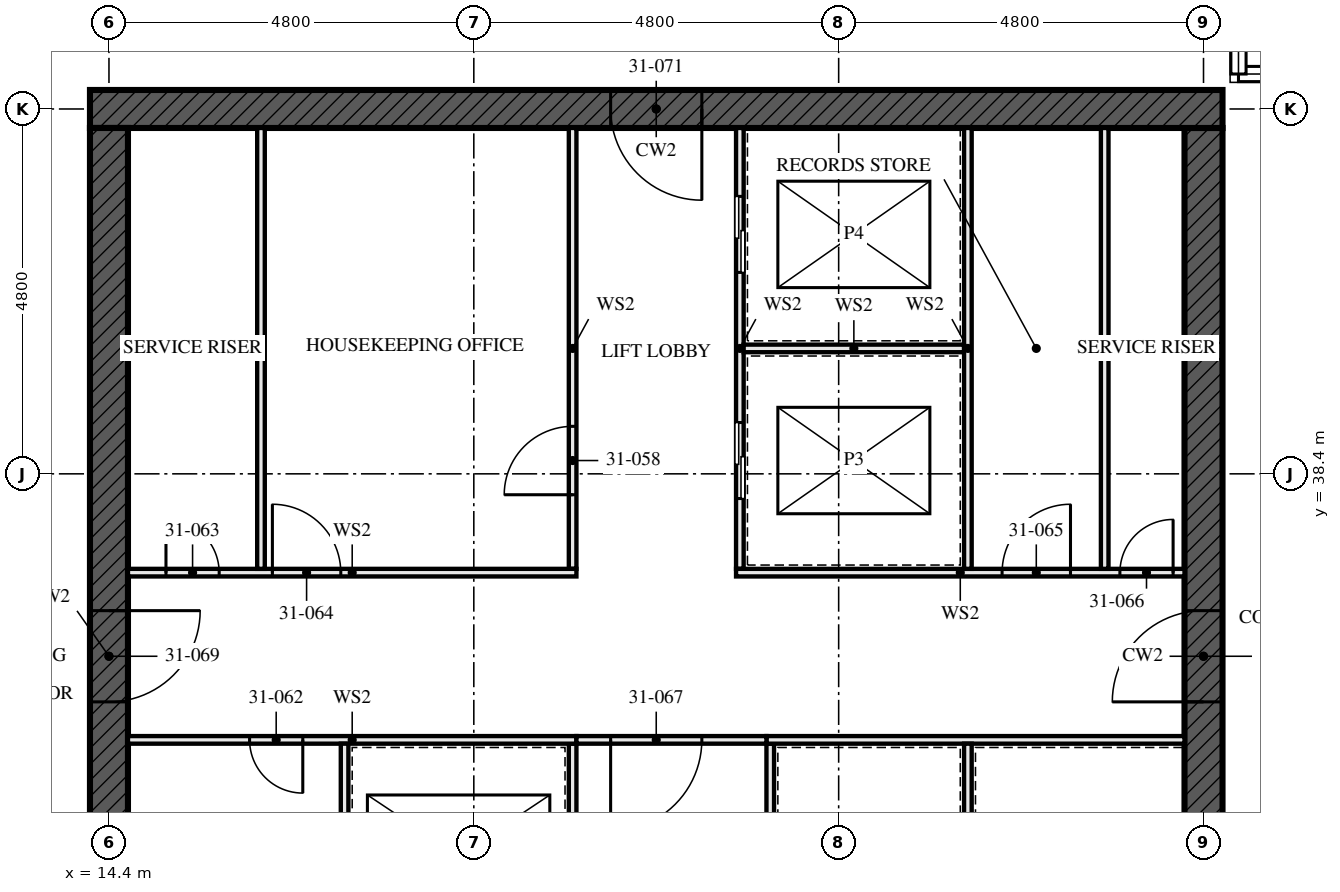
"""IFC4 building model, lengths in metres.
Left out: names, types, materials, properties, quantities, classifications, styles, units other than length and angle.
Written with IfcOpenShell. Run it as: python <this file> out.ifc"""

import sys

from ifc_helpers import new_model, si_unit, direction, frame, frame_2d, origin, place, context, subcontext, project, spatial, rectangle, extrude, element, fill, save


model = new_model("IFC4")
c1 = context("Model", 3, precision=1e-05, world=origin(), true_north=direction((0.0, 1.0)))
c2 = subcontext(c1, "Body", "Model", "MODEL_VIEW")
j1 = project(units=[si_unit("LENGTHUNIT", "METRE"), si_unit("PLANEANGLEUNIT", "RADIAN")], contexts=[c1])
p1 = place(None, origin())
s1 = spatial("IfcSite", under=j1, at=p1, CompositionType="ELEMENT")
p2 = place(p1, origin())
s2 = spatial("IfcBuilding", under=s1, at=p2, CompositionType="ELEMENT")
p3 = place(p2, frame((0.0, 0.0, 115.5)))
s3 = spatial("IfcBuildingStorey", under=s2, at=p3, CompositionType="ELEMENT", Elevation=115.5)
p4 = place(p3, frame((29.05, 43.2, -0.17), z_axis=(0.0, 0.0, 1.0), x_axis=(-1.0, 0.0, 0.0)))
e1 = element("IfcWall", 1, at=p4, inside=s3, PredefinedType="SHEAR", context=c2, shape_type="SweptSolid", body=[
    extrude(rectangle(XDim=14.9, YDim=0.5, at=frame_2d((7.45, 0.0))), origin(), (0.0, 0.0, 1.0), 3.5),
])
p5 = place(p4, frame((6.85, 0.0, 0.17)))
e2 = element("IfcOpeningElement", 2, at=p5, cuts=e1, PredefinedType="OPENING", context=c2, shape_type="SweptSolid", body=[
    extrude(rectangle(XDim=1.2, YDim=2.1, at=frame_2d((0.6, 1.05))), frame((0.0, 0.26, 0.0), z_axis=(0.0, -1.0, 0.0), x_axis=(1.0, 0.0, 0.0)), (0.0, 0.0, 1.0), 0.521),
])
p6 = place(p3, frame((14.4, 42.95, -0.17), z_axis=(0.0, 0.0, 1.0), x_axis=(0.0, -1.0, 0.0)))
e3 = element("IfcWall", 3, at=p6, inside=s3, PredefinedType="SHEAR", context=c2, shape_type="SweptSolid", body=[
    extrude(rectangle(XDim=13.9, YDim=0.5, at=frame_2d((6.95, 0.0))), origin(), (0.0, 0.0, 1.0), 3.5),
])
p7 = place(p6, frame((6.35, 0.0, 0.17)))
e4 = element("IfcOpeningElement", 4, at=p7, cuts=e3, PredefinedType="OPENING", context=c2, shape_type="SweptSolid", body=[
    extrude(rectangle(XDim=1.2, YDim=2.1, at=frame_2d((0.6, 1.05))), frame((0.0, 0.26, 0.0), z_axis=(0.0, -1.0, 0.0), x_axis=(1.0, 0.0, 0.0)), (0.0, 0.0, 1.0), 0.521),
])
p8 = place(p3, frame((28.8, 29.05, -0.17), z_axis=(0.0, 0.0, 1.0), x_axis=(0.0, 1.0, 0.0)))
e5 = element("IfcWall", 5, at=p8, inside=s3, PredefinedType="SHEAR", context=c2, shape_type="SweptSolid", body=[
    extrude(rectangle(XDim=13.9, YDim=0.5, at=frame_2d((6.95, 0.0))), origin(), (0.0, 0.0, 1.0), 3.5),
])
p9 = place(p8, frame((6.35, 0.0, 0.17)))
e6 = element("IfcOpeningElement", 6, at=p9, cuts=e5, PredefinedType="OPENING", context=c2, shape_type="SweptSolid", body=[
    extrude(rectangle(XDim=1.2, YDim=2.1, at=frame_2d((0.6, 1.05))), frame((0.0, 0.26, 0.0), z_axis=(0.0, -1.0, 0.0), x_axis=(1.0, 0.0, 0.0)), (0.0, 0.0, 1.0), 0.521),
])
for number, where, z_axis, x_axis in (
    (7, (16.4, 37.15, 0.0), (0.0, 0.0, 1.0), (0.0, 1.0, 0.0)),
    (8, (27.5, 37.15, 0.0), (0.0, 0.0, 1.0), (0.0, 1.0, 0.0)),
):
    element("IfcWall", number, at=place(p3, frame(where, z_axis=z_axis, x_axis=x_axis)), inside=s3, PredefinedType="SOLIDWALL", context=c2, shape_type="SweptSolid", body=[
        extrude(rectangle(XDim=5.8, YDim=0.1, at=frame_2d((2.9, 0.0))), origin(), (0.0, 0.0, 1.0), 3.33),
    ])
p10 = place(p3, frame((20.5, 29.05, 0.0), z_axis=(0.0, 0.0, 1.0), x_axis=(0.0, 1.0, 0.0)))
e9 = element("IfcWall", 9, at=p10, inside=s3, PredefinedType="SOLIDWALL", context=c2, shape_type="SweptSolid", body=[
    extrude(rectangle(XDim=5.8, YDim=0.1, at=frame_2d((2.9, 0.0))), origin(), (0.0, 0.0, 1.0), 3.33),
])
p11 = place(p10, frame((0.8, 0.0, 0.0)))
e10 = element("IfcOpeningElement", 10, at=p11, cuts=e9, PredefinedType="OPENING", context=c2, shape_type="SweptSolid", body=[
    extrude(rectangle(XDim=1.1, YDim=2.3, at=frame_2d((0.55, 1.15))), frame((0.0, 0.061, 0.0), z_axis=(0.0, -1.0, 0.0), x_axis=(1.0, 0.0, 0.0)), (0.0, 0.0, 1.0), 0.121),
])
p12 = place(p10, frame((3.775, 0.0, 0.0)))
e11 = element("IfcOpeningElement", 11, at=p12, cuts=e9, PredefinedType="OPENING", context=c2, shape_type="SweptSolid", body=[
    extrude(rectangle(XDim=1.1, YDim=2.3, at=frame_2d((0.55, 1.15))), frame((0.0, 0.061, 0.0), z_axis=(0.0, -1.0, 0.0), x_axis=(1.0, 0.0, 0.0)), (0.0, 0.0, 1.0), 0.121),
])
p13 = place(p3, frame((20.5, 37.15, 0.0), z_axis=(0.0, 0.0, 1.0), x_axis=(0.0, 1.0, 0.0)))
e12 = element("IfcWall", 12, at=p13, inside=s3, PredefinedType="SOLIDWALL", context=c2, shape_type="SweptSolid", body=[
    extrude(rectangle(XDim=5.8, YDim=0.1, at=frame_2d((2.9, 0.0))), origin(), (0.0, 0.0, 1.0), 3.33),
])
p14 = place(p13, frame((0.975, 0.0, 0.0)))
e13 = element("IfcOpeningElement", 13, at=p14, cuts=e12, PredefinedType="OPENING", context=c2, shape_type="SweptSolid", body=[
    extrude(rectangle(XDim=0.9, YDim=2.1, at=frame_2d((0.45, 1.05))), frame((0.0, 0.061, 0.0), z_axis=(0.0, -1.0, 0.0), x_axis=(1.0, 0.0, 0.0)), (0.0, 0.0, 1.0), 0.121),
])
p15 = place(p3, frame((22.7, 37.15, 0.0), z_axis=(0.0, 0.0, 1.0), x_axis=(0.0, 1.0, 0.0)))
e14 = element("IfcWall", 14, at=p15, inside=s3, PredefinedType="SOLIDWALL", context=c2, shape_type="SweptSolid", body=[
    extrude(rectangle(XDim=5.8, YDim=0.1, at=frame_2d((2.9, 0.0))), origin(), (0.0, 0.0, 1.0), 3.33),
])
p16 = place(p15, frame((0.925, 0.0, 0.0)))
e15 = element("IfcOpeningElement", 15, at=p16, cuts=e14, PredefinedType="OPENING", context=c2, shape_type="SweptSolid", body=[
    extrude(rectangle(XDim=1.0, YDim=2.1, at=frame_2d((0.5, 1.05))), frame((0.0, 0.061, 0.0), z_axis=(0.0, -1.0, 0.0), x_axis=(1.0, 0.0, 0.0)), (0.0, 0.0, 1.0), 0.121),
])
p17 = place(p15, frame((3.9, 0.0, 0.0)))
e16 = element("IfcOpeningElement", 16, at=p17, cuts=e14, PredefinedType="OPENING", context=c2, shape_type="SweptSolid", body=[
    extrude(rectangle(XDim=1.0, YDim=2.1, at=frame_2d((0.5, 1.05))), frame((0.0, 0.061, 0.0), z_axis=(0.0, -1.0, 0.0), x_axis=(1.0, 0.0, 0.0)), (0.0, 0.0, 1.0), 0.121),
])
p18 = place(p3, frame((23.1, 29.05, 0.0), z_axis=(0.0, 0.0, 1.0), x_axis=(0.0, 1.0, 0.0)))
e17 = element("IfcWall", 17, at=p18, inside=s3, PredefinedType="SOLIDWALL", context=c2, shape_type="SweptSolid", body=[
    extrude(rectangle(XDim=5.8, YDim=0.1, at=frame_2d((2.9, 0.0))), origin(), (0.0, 0.0, 1.0), 3.33),
])
p19 = place(p18, frame((1.0, 0.0, 0.0)))
e18 = element("IfcOpeningElement", 18, at=p19, cuts=e17, PredefinedType="OPENING", context=c2, shape_type="SweptSolid", body=[
    extrude(rectangle(XDim=0.7, YDim=2.1, at=frame_2d((0.35, 1.05))), frame((0.0, 0.061, 0.0), z_axis=(0.0, -1.0, 0.0), x_axis=(1.0, 0.0, 0.0)), (0.0, 0.0, 1.0), 0.121),
])
p20 = place(p3, frame((14.65, 34.9, 0.0), z_axis=(0.0, 0.0, 1.0), x_axis=(1.0, 0.0, 0.0)))
e19 = element("IfcWall", 19, at=p20, inside=s3, PredefinedType="SOLIDWALL", context=c2, shape_type="SweptSolid", body=[
    extrude(rectangle(XDim=5.9, YDim=0.1, at=frame_2d((2.95, 0.0))), origin(), (0.0, 0.0, 1.0), 3.33),
])
p21 = place(p20, frame((1.6, 0.0, 0.0)))
e20 = element("IfcOpeningElement", 20, at=p21, cuts=e19, PredefinedType="OPENING", context=c2, shape_type="SweptSolid", body=[
    extrude(rectangle(XDim=0.7, YDim=2.1, at=frame_2d((0.35, 1.05))), frame((0.0, 0.061, 0.0), z_axis=(0.0, -1.0, 0.0), x_axis=(1.0, 0.0, 0.0)), (0.0, 0.0, 1.0), 0.121),
])
p22 = place(p3, frame((23.05, 34.9, 0.0), z_axis=(0.0, 0.0, 1.0), x_axis=(1.0, 0.0, 0.0)))
e21 = element("IfcWall", 21, at=p22, inside=s3, PredefinedType="SOLIDWALL", context=c2, shape_type="SweptSolid", body=[
    extrude(rectangle(XDim=5.5, YDim=0.1, at=frame_2d((2.75, 0.0))), origin(), (0.0, 0.0, 1.0), 3.33),
])
p23 = place(p3, frame((14.65, 37.1, 0.0), z_axis=(0.0, 0.0, 1.0), x_axis=(1.0, 0.0, 0.0)))
e22 = element("IfcWall", 22, at=p23, inside=s3, PredefinedType="SOLIDWALL", context=c2, shape_type="SweptSolid", body=[
    extrude(rectangle(XDim=5.9, YDim=0.1, at=frame_2d((2.95, 0.0))), origin(), (0.0, 0.0, 1.0), 3.33),
])
p24 = place(p23, frame((0.5, 0.0, 0.0)))
e23 = element("IfcOpeningElement", 23, at=p24, cuts=e22, PredefinedType="OPENING", context=c2, shape_type="SweptSolid", body=[
    extrude(rectangle(XDim=0.7, YDim=2.1, at=frame_2d((0.35, 1.05))), frame((0.0, 0.061, 0.0), z_axis=(0.0, -1.0, 0.0), x_axis=(1.0, 0.0, 0.0)), (0.0, 0.0, 1.0), 0.121),
])
p25 = place(p23, frame((1.9, 0.0, 0.0)))
e24 = element("IfcOpeningElement", 24, at=p25, cuts=e22, PredefinedType="OPENING", context=c2, shape_type="SweptSolid", body=[
    extrude(rectangle(XDim=0.9, YDim=2.1, at=frame_2d((0.45, 1.05))), frame((0.0, 0.061, 0.0), z_axis=(0.0, -1.0, 0.0), x_axis=(1.0, 0.0, 0.0)), (0.0, 0.0, 1.0), 0.121),
])
p26 = place(p3, frame((22.65, 37.1, 0.0), z_axis=(0.0, 0.0, 1.0), x_axis=(1.0, 0.0, 0.0)))
e25 = element("IfcWall", 25, at=p26, inside=s3, PredefinedType="SOLIDWALL", context=c2, shape_type="SweptSolid", body=[
    extrude(rectangle(XDim=5.9, YDim=0.1, at=frame_2d((2.95, 0.0))), origin(), (0.0, 0.0, 1.0), 3.33),
])
p27 = place(p26, frame((3.5, 0.0, 0.0)))
e26 = element("IfcOpeningElement", 26, at=p27, cuts=e25, PredefinedType="OPENING", context=c2, shape_type="SweptSolid", body=[
    extrude(rectangle(XDim=0.9, YDim=2.1, at=frame_2d((0.45, 1.05))), frame((0.0, 0.061, 0.0), z_axis=(0.0, -1.0, 0.0), x_axis=(1.0, 0.0, 0.0)), (0.0, 0.0, 1.0), 0.121),
])
p28 = place(p26, frame((5.05, 0.0, 0.0)))
e27 = element("IfcOpeningElement", 27, at=p28, cuts=e25, PredefinedType="OPENING", context=c2, shape_type="SweptSolid", body=[
    extrude(rectangle(XDim=0.7, YDim=2.1, at=frame_2d((0.35, 1.05))), frame((0.0, 0.061, 0.0), z_axis=(0.0, -1.0, 0.0), x_axis=(1.0, 0.0, 0.0)), (0.0, 0.0, 1.0), 0.121),
])
p29 = place(p3, frame((20.55, 34.9, 0.0), z_axis=(0.0, 0.0, 1.0), x_axis=(1.0, 0.0, 0.0)))
e28 = element("IfcWall", 28, at=p29, inside=s3, PredefinedType="SOLIDWALL", context=c2, shape_type="SweptSolid", body=[
    extrude(rectangle(XDim=2.5, YDim=0.1, at=frame_2d((1.25, 0.0))), origin(), (0.0, 0.0, 1.0), 3.33),
])
p30 = place(p29, frame((0.45, 0.0, 0.0)))
e29 = element("IfcOpeningElement", 29, at=p30, cuts=e28, PredefinedType="OPENING", context=c2, shape_type="SweptSolid", body=[
    extrude(rectangle(XDim=1.2, YDim=2.1, at=frame_2d((0.6, 1.05))), frame((0.0, 0.061, 0.0), z_axis=(0.0, -1.0, 0.0), x_axis=(1.0, 0.0, 0.0)), (0.0, 0.0, 1.0), 0.121),
])
p31 = place(p3, frame((17.5, 29.05, 0.0), z_axis=(0.0, 0.0, 1.0), x_axis=(0.0, 1.0, 0.0)))
e30 = element("IfcWall", 30, at=p31, inside=s3, PredefinedType="SOLIDWALL", context=c2, shape_type="SweptSolid", body=[
    extrude(rectangle(XDim=5.8, YDim=0.1, at=frame_2d((2.9, 0.0))), origin(), (0.0, 0.0, 1.0), 3.33),
])
p32 = place(p3, frame((22.75, 40.05, 0.0), z_axis=(0.0, 0.0, 1.0), x_axis=(1.0, 0.0, 0.0)))
e31 = element("IfcWall", 31, at=p32, inside=s3, PredefinedType="SOLIDWALL", context=c2, shape_type="SweptSolid", body=[
    extrude(rectangle(XDim=2.9, YDim=0.1, at=frame_2d((1.45, 0.0))), origin(), (0.0, 0.0, 1.0), 3.33),
])
p33 = place(p3, frame((25.7, 37.15, 0.0), z_axis=(0.0, 0.0, 1.0), x_axis=(0.0, 1.0, 0.0)))
e32 = element("IfcWall", 32, at=p33, inside=s3, PredefinedType="SOLIDWALL", context=c2, shape_type="SweptSolid", body=[
    extrude(rectangle(XDim=5.8, YDim=0.1, at=frame_2d((2.9, 0.0))), origin(), (0.0, 0.0, 1.0), 3.33),
])
p34 = place(p3, frame((25.7, 31.95, 0.0), z_axis=(0.0, 0.0, 1.0), x_axis=(0.0, 1.0, 0.0)))
e33 = element("IfcWall", 33, at=p34, inside=s3, PredefinedType="SOLIDWALL", context=c2, shape_type="SweptSolid", body=[
    extrude(rectangle(XDim=2.9, YDim=0.1, at=frame_2d((1.45, 0.0))), origin(), (0.0, 0.0, 1.0), 3.33),
])
p35 = place(p14, origin())
e34 = element("IfcDoor", 34, at=p35, inside=s3, OperationType="SINGLE_SWING_RIGHT", PredefinedType="DOOR", context=c2, shape_type="SweptSolid", body=[
    extrude(rectangle(XDim=0.9, YDim=2.1, at=frame_2d((0.45, 1.05))), frame((0.0, 0.027, 0.0), z_axis=(0.0, -1.0, 0.0), x_axis=(1.0, 0.0, 0.0)), (0.0, 0.0, 1.0), 0.054),
])
fill(e13, e34)
p36 = place(p16, origin())
e35 = element("IfcDoor", 35, at=p36, inside=s3, OperationType="SLIDING_TO_LEFT", PredefinedType="DOOR", context=c2, shape_type="SweptSolid", body=[
    extrude(rectangle(XDim=1.0, YDim=2.1, at=frame_2d((0.5, 1.05))), frame((0.0, 0.05, 0.0), z_axis=(0.0, -1.0, 0.0), x_axis=(1.0, 0.0, 0.0)), (0.0, 0.0, 1.0), 0.1),
])
fill(e15, e35)
p37 = place(p17, origin())
e36 = element("IfcDoor", 36, at=p37, inside=s3, OperationType="SLIDING_TO_LEFT", PredefinedType="DOOR", context=c2, shape_type="SweptSolid", body=[
    extrude(rectangle(XDim=1.0, YDim=2.1, at=frame_2d((0.5, 1.05))), frame((0.0, 0.05, 0.0), z_axis=(0.0, -1.0, 0.0), x_axis=(1.0, 0.0, 0.0)), (0.0, 0.0, 1.0), 0.1),
])
fill(e16, e36)
p38 = place(p21, frame((0.7, 0.0, 0.0), z_axis=(0.0, 0.0, 1.0), x_axis=(-1.0, 0.0, 0.0)))
e37 = element("IfcDoor", 37, at=p38, inside=s3, OperationType="SINGLE_SWING_RIGHT", PredefinedType="DOOR", context=c2, shape_type="SweptSolid", body=[
    extrude(rectangle(XDim=0.7, YDim=2.1, at=frame_2d((0.35, 1.05))), frame((0.0, 0.027, 0.0), z_axis=(0.0, -1.0, 0.0), x_axis=(1.0, 0.0, 0.0)), (0.0, 0.0, 1.0), 0.054),
])
fill(e20, e37)
p39 = place(p24, origin())
e38 = element("IfcDoor", 38, at=p39, inside=s3, OperationType="SINGLE_SWING_RIGHT", PredefinedType="DOOR", context=c2, shape_type="SweptSolid", body=[
    extrude(rectangle(XDim=0.7, YDim=2.1, at=frame_2d((0.35, 1.05))), frame((0.0, 0.027, 0.0), z_axis=(0.0, -1.0, 0.0), x_axis=(1.0, 0.0, 0.0)), (0.0, 0.0, 1.0), 0.054),
])
fill(e23, e38)
p40 = place(p25, origin())
e39 = element("IfcDoor", 39, at=p40, inside=s3, OperationType="SINGLE_SWING_RIGHT", PredefinedType="DOOR", context=c2, shape_type="SweptSolid", body=[
    extrude(rectangle(XDim=0.9, YDim=2.1, at=frame_2d((0.45, 1.05))), frame((0.0, 0.027, 0.0), z_axis=(0.0, -1.0, 0.0), x_axis=(1.0, 0.0, 0.0)), (0.0, 0.0, 1.0), 0.054),
])
fill(e24, e39)
p41 = place(p27, origin())
e40 = element("IfcDoor", 40, at=p41, inside=s3, OperationType="SINGLE_SWING_LEFT", PredefinedType="DOOR", context=c2, shape_type="SweptSolid", body=[
    extrude(rectangle(XDim=0.9, YDim=2.1, at=frame_2d((0.45, 1.05))), frame((0.0, 0.027, 0.0), z_axis=(0.0, -1.0, 0.0), x_axis=(1.0, 0.0, 0.0)), (0.0, 0.0, 1.0), 0.054),
])
fill(e26, e40)
p42 = place(p28, origin())
e41 = element("IfcDoor", 41, at=p42, inside=s3, OperationType="SINGLE_SWING_LEFT", PredefinedType="DOOR", context=c2, shape_type="SweptSolid", body=[
    extrude(rectangle(XDim=0.7, YDim=2.1, at=frame_2d((0.35, 1.05))), frame((0.0, 0.027, 0.0), z_axis=(0.0, -1.0, 0.0), x_axis=(1.0, 0.0, 0.0)), (0.0, 0.0, 1.0), 0.054),
])
fill(e27, e41)
p43 = place(p30, frame((1.2, 0.0, 0.0), z_axis=(0.0, 0.0, 1.0), x_axis=(-1.0, 0.0, 0.0)))
e42 = element("IfcDoor", 42, at=p43, inside=s3, OperationType="SINGLE_SWING_LEFT", PredefinedType="DOOR", context=c2, shape_type="SweptSolid", body=[
    extrude(rectangle(XDim=1.2, YDim=2.1, at=frame_2d((0.6, 1.05))), frame((0.0, 0.027, 0.0), z_axis=(0.0, -1.0, 0.0), x_axis=(1.0, 0.0, 0.0)), (0.0, 0.0, 1.0), 0.054),
])
fill(e29, e42)
p44 = place(p7, origin())
e43 = element("IfcDoor", 43, at=p44, inside=s3, OperationType="SINGLE_SWING_LEFT", PredefinedType="DOOR", context=c2, shape_type="SweptSolid", body=[
    extrude(rectangle(XDim=1.2, YDim=2.1, at=frame_2d((0.6, 1.05))), frame((0.0, 0.027, 0.0), z_axis=(0.0, -1.0, 0.0), x_axis=(1.0, 0.0, 0.0)), (0.0, 0.0, 1.0), 0.054),
])
fill(e4, e43)
p45 = place(p9, origin())
e44 = element("IfcDoor", 44, at=p45, inside=s3, OperationType="SINGLE_SWING_LEFT", PredefinedType="DOOR", context=c2, shape_type="SweptSolid", body=[
    extrude(rectangle(XDim=1.2, YDim=2.1, at=frame_2d((0.6, 1.05))), frame((0.0, 0.027, 0.0), z_axis=(0.0, -1.0, 0.0), x_axis=(1.0, 0.0, 0.0)), (0.0, 0.0, 1.0), 0.054),
])
fill(e6, e44)
p46 = place(p5, origin())
e45 = element("IfcDoor", 45, at=p46, inside=s3, OperationType="SINGLE_SWING_LEFT", PredefinedType="DOOR", context=c2, shape_type="SweptSolid", body=[
    extrude(rectangle(XDim=1.2, YDim=2.1, at=frame_2d((0.6, 1.05))), frame((0.0, 0.027, 0.0), z_axis=(0.0, -1.0, 0.0), x_axis=(1.0, 0.0, 0.0)), (0.0, 0.0, 1.0), 0.054),
])
fill(e2, e45)
save(model, sys.argv[1])
